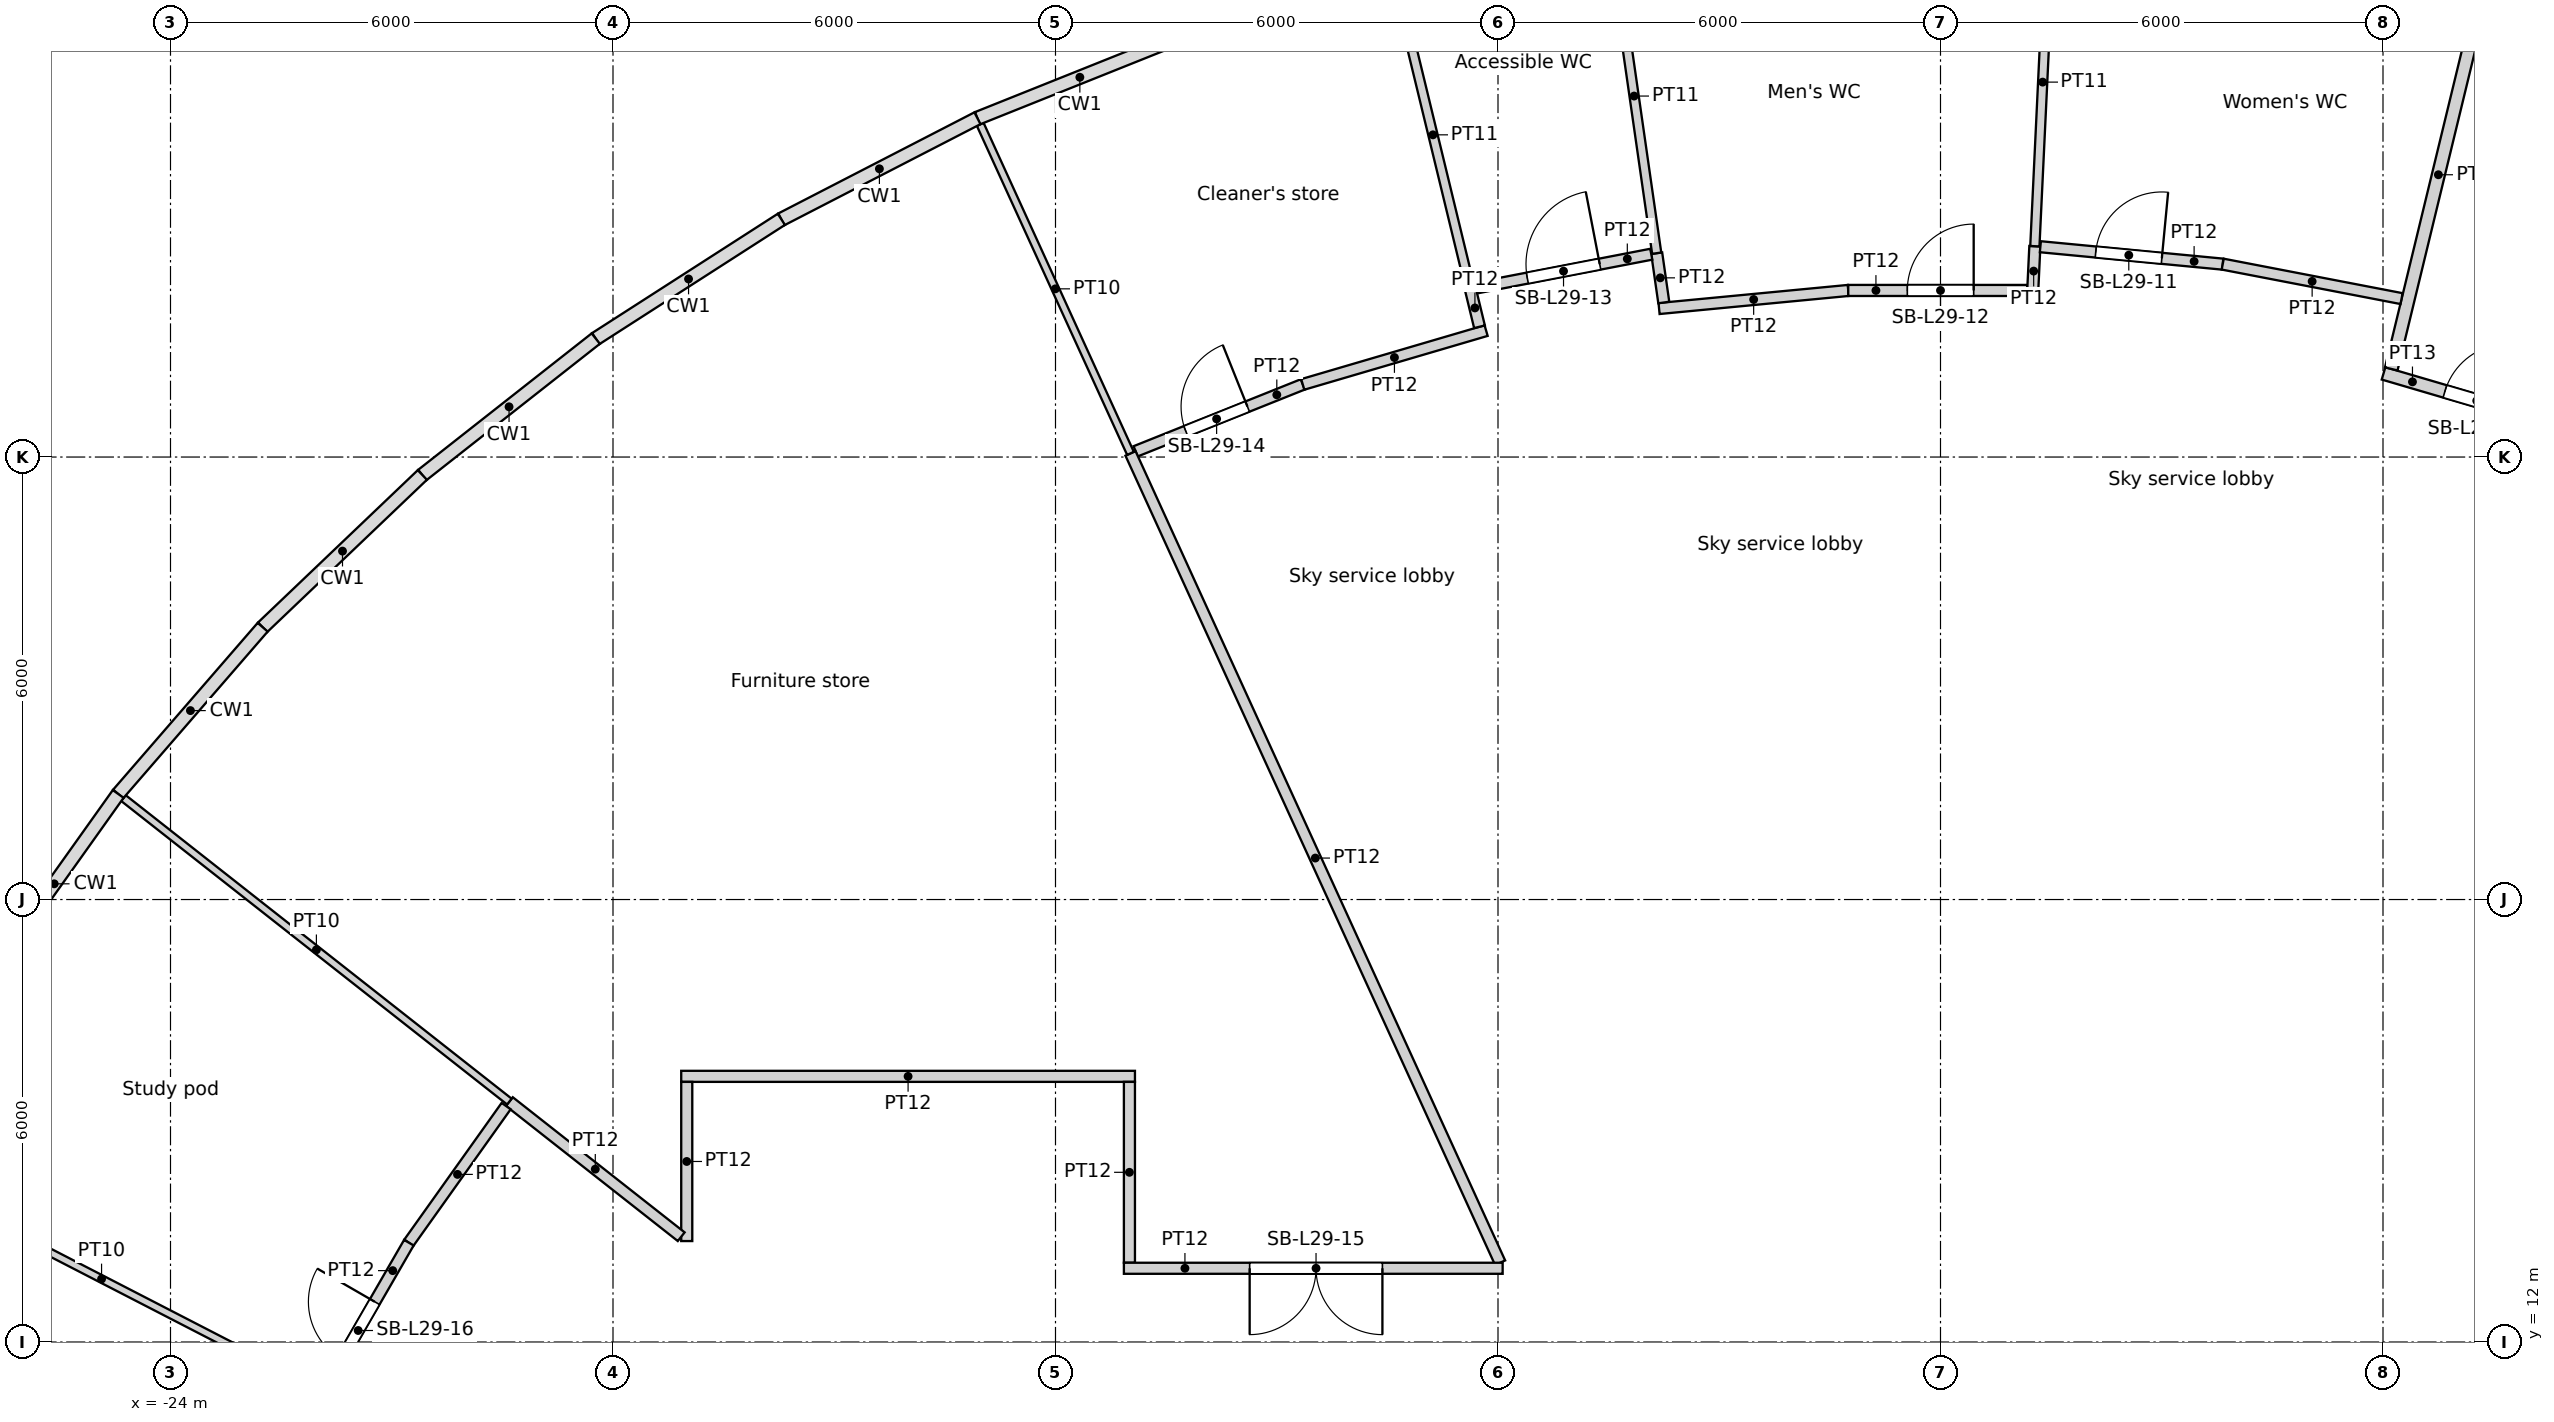
"""IFC4 building model, lengths in metres.
Left out: names, types, materials, properties, quantities, classifications, styles, units other than length and angle.
Written with IfcOpenShell. Run it as: python <this file> out.ifc"""

import sys

from ifc_helpers import new_model, si_unit, direction, frame, frame_2d, origin, origin_2d, place, context, subcontext, project, spatial, rectangle, circle, extrude, element, fill, save


model = new_model("IFC4")
c1 = context("Model", 3, precision=1e-05, world=origin(), true_north=direction((0.0, 1.0)))
c2 = subcontext(c1, "Body", "Model", "MODEL_VIEW")
j1 = project(units=[si_unit("LENGTHUNIT", "METRE"), si_unit("PLANEANGLEUNIT", "RADIAN")], contexts=[c1])
p1 = place(None, origin())
s1 = spatial("IfcSite", under=j1, at=p1, CompositionType="ELEMENT")
p2 = place(p1, origin())
s2 = spatial("IfcBuilding", under=s1, at=p2, CompositionType="ELEMENT")
p3 = place(p2, frame((0.0, 0.0, 114.6)))
s3 = spatial("IfcBuildingStorey", under=s2, at=p3, CompositionType="ELEMENT", Elevation=114.6)
for number, where, z_axis, x_axis in (
    (1, (7.137, 29.421, 0.0), (0.0, 0.0, 1.0), (1.0, 0.0, 0.0)),
    (2, (-4.309, 29.966, 0.0), (0.0, 0.0, 1.0), (1.0, 0.0, 0.0)),
    (3, (-9.902, 28.61, 0.0), (0.0, 0.0, 1.0), (1.0, 0.0, 0.0)),
    (4, (-15.137, 26.219, 0.0), (0.0, 0.0, 1.0), (1.0, 0.0, 0.0)),
    (5, (-19.826, 22.88, 0.0), (0.0, 0.0, 1.0), (1.0, 0.0, 0.0)),
    (6, (-23.797, 18.715, 0.0), (0.0, 0.0, 1.0), (1.0, 0.0, 0.0)),
):
    element("IfcColumn", number, at=place(p3, frame(where, z_axis=z_axis, x_axis=x_axis)), inside=s3, PredefinedType="COLUMN", context=c2, shape_type="SweptSolid", body=[
        extrude(circle(Radius=0.6, at=origin_2d()), origin(), (0.0, 0.0, 1.0), 5.4),
    ])
for number, where, z_axis, x_axis in (
    (7, (4.263, 24.175, 0.0), (0.0, 0.0, 1.0), (1.0, 0.0, 0.0)),
    (8, (-1.427, 24.506, 0.0), (0.0, 0.0, 1.0), (1.0, 0.0, 0.0)),
    (9, (-7.04, 23.516, 0.0), (0.0, 0.0, 1.0), (1.0, 0.0, 0.0)),
    (10, (-12.274, 21.259, 0.0), (0.0, 0.0, 1.0), (1.0, 0.0, 0.0)),
    (11, (-16.846, 17.855, 0.0), (0.0, 0.0, 1.0), (1.0, 0.0, 0.0)),
    (12, (-20.509, 13.489, 0.0), (0.0, 0.0, 1.0), (1.0, 0.0, 0.0)),
):
    element("IfcColumn", number, at=place(p3, frame(where, z_axis=z_axis, x_axis=x_axis)), inside=s3, PredefinedType="COLUMN", context=c2, shape_type="SweptSolid", body=[
        extrude(circle(Radius=0.65, at=origin_2d()), origin(), (0.0, 0.0, 1.0), 5.4),
    ])
for number, where, z_axis, x_axis in (
    (13, (6.876, 17.521, 0.0), (0.0, 0.0, 1.0), (1.0, 0.0, 0.0)),
    (14, (1.406, 18.77, 0.0), (0.0, 0.0, 1.0), (1.0, 0.0, 0.0)),
    (15, (-4.188, 18.35, 0.0), (0.0, 0.0, 1.0), (1.0, 0.0, 0.0)),
    (16, (-9.411, 16.301, 0.0), (0.0, 0.0, 1.0), (1.0, 0.0, 0.0)),
    (17, (-13.798, 12.802, 0.0), (0.0, 0.0, 1.0), (1.0, 0.0, 0.0)),
):
    element("IfcColumn", number, at=place(p3, frame(where, z_axis=z_axis, x_axis=x_axis)), inside=s3, PredefinedType="COLUMN", context=c2, shape_type="SweptSolid", body=[
        extrude(circle(Radius=0.7, at=origin_2d()), origin(), (0.0, 0.0, 1.0), 5.4),
    ])
p4 = place(p3, frame((-27.86, 14.363, 0.0), z_axis=(0.0, 0.0, 1.0), x_axis=(0.88884777779, -0.458202605751, 0.0)))
e18 = element("IfcWall", 18, at=p4, inside=s3, PredefinedType="PARTITIONING", context=c2, shape_type="SweptSolid", body=[
    extrude(rectangle(XDim=6.583, YDim=0.1, at=frame_2d((3.291, 0.0))), origin(), (0.0, 0.0, 1.0), 4.0),
])
p5 = place(p3, frame((-24.638, 19.376, 0.0), z_axis=(0.0, 0.0, 1.0), x_axis=(0.786065039075, -0.618143797464, 0.0)))
e19 = element("IfcWall", 19, at=p5, inside=s3, PredefinedType="PARTITIONING", context=c2, shape_type="SweptSolid", body=[
    extrude(rectangle(XDim=6.657, YDim=0.1, at=frame_2d((3.329, 0.0))), origin(), (0.0, 0.0, 1.0), 4.0),
])
p6 = place(p3, frame((-21.943, 11.312, 0.0), z_axis=(0.0, 0.0, 1.0), x_axis=(0.500073279432, 0.865983091751, 0.0)))
e20 = element("IfcWall", 20, at=p6, inside=s3, PredefinedType="PARTITIONING", context=c2, shape_type="SweptSolid", body=[
    extrude(rectangle(XDim=2.349, YDim=0.15, at=frame_2d((1.175, 0.0))), origin(), (0.0, 0.0, 1.0), 4.0),
])
p7 = place(p6, frame((0.525, 0.0, 0.0)))
e21 = element("IfcOpeningElement", 21, at=p7, cuts=e20, PredefinedType="OPENING", context=c2, shape_type="SweptSolid", body=[
    extrude(rectangle(XDim=0.9, YDim=2.1, at=frame_2d((0.45, 1.05))), frame((0.0, 0.075, 0.0), z_axis=(0.0, -1.0, 0.0), x_axis=(1.0, 0.0, 0.0)), (0.0, 0.0, 1.0), 0.15),
])
p8 = place(p3, frame((-19.449, 15.199, 0.0), z_axis=(0.0, 0.0, 1.0), x_axis=(-0.580029104411, -0.8145957513, 0.0)))
e22 = element("IfcWall", 22, at=p8, inside=s3, PredefinedType="PARTITIONING", context=c2, shape_type="SweptSolid", body=[
    extrude(rectangle(XDim=2.274, YDim=0.15, at=frame_2d((1.137, 0.0))), origin(), (0.0, 0.0, 1.0), 4.0),
])
p9 = place(p3, frame((-19.405, 15.26, 0.0), z_axis=(0.0, 0.0, 1.0), x_axis=(0.78606393764, -0.618145198106, 0.0)))
e23 = element("IfcWall", 23, at=p9, inside=s3, PredefinedType="PARTITIONING", context=c2, shape_type="SweptSolid", body=[
    extrude(rectangle(XDim=2.965, YDim=0.15, at=frame_2d((1.482, 0.0))), origin(), (0.0, 0.0, 1.0), 4.0),
])
p10 = place(p3, frame((-17.0, 15.527, 0.0), z_axis=(0.0, 0.0, 1.0), x_axis=(0.0, -1.0, 0.0)))
e24 = element("IfcWall", 24, at=p10, inside=s3, PredefinedType="PARTITIONING", context=c2, shape_type="SweptSolid", body=[
    extrude(rectangle(XDim=2.158, YDim=0.15, at=frame_2d((1.079, 0.0))), origin(), (0.0, 0.0, 1.0), 4.0),
])
p11 = place(p3, frame((-13.021, 28.512, 0.0), z_axis=(0.0, 0.0, 1.0), x_axis=(0.415403363215, -0.909637315544, 0.0)))
e25 = element("IfcWall", 25, at=p11, inside=s3, PredefinedType="PARTITIONING", context=c2, shape_type="SweptSolid", body=[
    extrude(rectangle(XDim=4.906, YDim=0.1, at=frame_2d((2.453, 0.0))), origin(), (0.0, 0.0, 1.0), 4.0),
])
p12 = place(p3, frame((-10.998, 13.075, 0.0), z_axis=(0.0, 0.0, 1.0), x_axis=(0.0, 1.0, 0.0)))
e26 = element("IfcWall", 26, at=p12, inside=s3, PredefinedType="PARTITIONING", context=c2, shape_type="SweptSolid", body=[
    extrude(rectangle(XDim=2.452, YDim=0.15, at=frame_2d((1.226, 0.0))), origin(), (0.0, 0.0, 1.0), 4.0),
])
p13 = place(p3, frame((-10.923, 15.602, 0.0), z_axis=(0.0, 0.0, 1.0), x_axis=(-1.0, 0.0, 0.0)))
e27 = element("IfcWall", 27, at=p13, inside=s3, PredefinedType="PARTITIONING", context=c2, shape_type="SweptSolid", body=[
    extrude(rectangle(XDim=6.152, YDim=0.15, at=frame_2d((3.076, 0.0))), origin(), (0.0, 0.0, 1.0), 4.0),
])
p14 = place(p3, frame((-10.983, 24.05, 0.0), z_axis=(0.0, 0.0, 1.0), x_axis=(0.415416845748, -0.909631158365, 0.0)))
e28 = element("IfcWall", 28, at=p14, inside=s3, PredefinedType="PARTITIONING", context=c2, shape_type="SweptSolid", body=[
    extrude(rectangle(XDim=12.065, YDim=0.15, at=frame_2d((6.032, 0.0))), origin(), (0.0, 0.0, 1.0), 4.0),
])
p15 = place(p3, frame((-10.913, 24.077, 0.0), z_axis=(0.0, 0.0, 1.0), x_axis=(0.928366285294, 0.371666571445, 0.0)))
e29 = element("IfcWall", 29, at=p15, inside=s3, PredefinedType="PARTITIONING", context=c2, shape_type="SweptSolid", body=[
    extrude(rectangle(XDim=2.441, YDim=0.15, at=frame_2d((1.22, 0.0))), origin(), (0.0, 0.0, 1.0), 4.0),
])
p16 = place(p15, frame((0.733, 0.0, 0.0)))
e30 = element("IfcOpeningElement", 30, at=p16, cuts=e29, PredefinedType="OPENING", context=c2, shape_type="SweptSolid", body=[
    extrude(rectangle(XDim=0.9, YDim=2.1, at=frame_2d((0.45, 1.05))), frame((0.0, 0.075, 0.0), z_axis=(0.0, -1.0, 0.0), x_axis=(1.0, 0.0, 0.0)), (0.0, 0.0, 1.0), 0.15),
])
p17 = place(p3, frame((-7.39, 30.461, 0.0), z_axis=(0.0, 0.0, 1.0), x_axis=(0.235763969247, -0.971810347138, 0.0)))
e31 = element("IfcWall", 31, at=p17, inside=s3, PredefinedType="PARTITIONING", context=c2, shape_type="SweptSolid", body=[
    extrude(rectangle(XDim=4.305, YDim=0.125, at=frame_2d((2.152, 0.0))), origin(), (0.0, 0.0, 1.0), 4.0),
])
p18 = place(p3, frame((-6.375, 26.277, 0.0), z_axis=(0.0, 0.0, 1.0), x_axis=(0.235533543779, -0.971866220091, 0.0)))
e32 = element("IfcWall", 32, at=p18, inside=s3, PredefinedType="PARTITIONING", context=c2, shape_type="SweptSolid", body=[
    extrude(rectangle(XDim=0.526, YDim=0.15, at=frame_2d((0.263, 0.0))), origin(), (0.0, 0.0, 1.0), 4.0),
])
p19 = place(p3, frame((-6.161, 25.715, 0.0), z_axis=(0.0, 0.0, 1.0), x_axis=(-0.959492937384, -0.28173268023, 0.0)))
e33 = element("IfcWall", 33, at=p19, inside=s3, PredefinedType="PARTITIONING", context=c2, shape_type="SweptSolid", body=[
    extrude(rectangle(XDim=2.591, YDim=0.15, at=frame_2d((1.295, 0.0))), origin(), (0.0, 0.0, 1.0), 4.0),
])
p20 = place(p3, frame((-11.073, 13.0, 0.0), z_axis=(0.0, 0.0, 1.0), x_axis=(1.0, 0.0, 0.0)))
e34 = element("IfcWall", 34, at=p20, inside=s3, PredefinedType="PARTITIONING", context=c2, shape_type="SweptSolid", body=[
    extrude(rectangle(XDim=5.135, YDim=0.15, at=frame_2d((2.568, 0.0))), origin(), (0.0, 0.0, 1.0), 4.0),
])
p21 = place(p20, frame((1.705, 0.0, 0.0)))
e35 = element("IfcOpeningElement", 35, at=p21, cuts=e34, PredefinedType="OPENING", context=c2, shape_type="SweptSolid", body=[
    extrude(rectangle(XDim=1.8, YDim=2.4, at=frame_2d((0.9, 1.2))), frame((0.0, 0.075, 0.0), z_axis=(0.0, -1.0, 0.0), x_axis=(1.0, 0.0, 0.0)), (0.0, 0.0, 1.0), 0.15),
])
p22 = place(p3, frame((-4.461, 31.025, 0.0), z_axis=(0.0, 0.0, 1.0), x_axis=(0.142294692294, -0.989824338226, 0.0)))
e36 = element("IfcWall", 36, at=p22, inside=s3, PredefinedType="PARTITIONING", context=c2, shape_type="SweptSolid", body=[
    extrude(rectangle(XDim=4.305, YDim=0.125, at=frame_2d((2.152, 0.0))), origin(), (0.0, 0.0, 1.0), 4.0),
])
p23 = place(p3, frame((-6.301, 26.292, 0.0), z_axis=(0.0, 0.0, 1.0), x_axis=(0.981932344741, 0.189232318463, 0.0)))
e37 = element("IfcWall", 37, at=p23, inside=s3, PredefinedType="PARTITIONING", context=c2, shape_type="SweptSolid", body=[
    extrude(rectangle(XDim=2.423, YDim=0.15, at=frame_2d((1.211, 0.0))), origin(), (0.0, 0.0, 1.0), 4.0),
])
p24 = place(p23, frame((0.711, 0.0, 0.0)))
e38 = element("IfcOpeningElement", 38, at=p24, cuts=e37, PredefinedType="OPENING", context=c2, shape_type="SweptSolid", body=[
    extrude(rectangle(XDim=1.0, YDim=2.1, at=frame_2d((0.5, 1.05))), frame((0.0, 0.075, 0.0), z_axis=(0.0, -1.0, 0.0), x_axis=(1.0, 0.0, 0.0)), (0.0, 0.0, 1.0), 0.15),
])
p25 = place(p3, frame((-3.848, 26.764, 0.0), z_axis=(0.0, 0.0, 1.0), x_axis=(0.142280765431, -0.989826340218, 0.0)))
e39 = element("IfcWall", 39, at=p25, inside=s3, PredefinedType="PARTITIONING", context=c2, shape_type="SweptSolid", body=[
    extrude(rectangle(XDim=0.676, YDim=0.15, at=frame_2d((0.338, 0.0))), origin(), (0.0, 0.0, 1.0), 4.0),
])
p26 = place(p3, frame((-1.251, 26.259, 0.0), z_axis=(0.0, 0.0, 1.0), x_axis=(-0.995473727837, -0.095037135829, 0.0)))
e40 = element("IfcWall", 40, at=p26, inside=s3, PredefinedType="PARTITIONING", context=c2, shape_type="SweptSolid", body=[
    extrude(rectangle(XDim=2.577, YDim=0.15, at=frame_2d((1.288, 0.0))), origin(), (0.0, 0.0, 1.0), 4.0),
])
p27 = place(p3, frame((-1.251, 26.259, 0.0), z_axis=(0.0, 0.0, 1.0), x_axis=(1.0, 0.0, 0.0)))
e41 = element("IfcWall", 41, at=p27, inside=s3, PredefinedType="PARTITIONING", context=c2, shape_type="SweptSolid", body=[
    extrude(rectangle(XDim=2.427, YDim=0.15, at=frame_2d((1.213, 0.0))), origin(), (0.0, 0.0, 1.0), 4.0),
])
p28 = place(p27, frame((0.801, 0.0, 0.0)))
e42 = element("IfcOpeningElement", 42, at=p28, cuts=e41, PredefinedType="OPENING", context=c2, shape_type="SweptSolid", body=[
    extrude(rectangle(XDim=0.9, YDim=2.1, at=frame_2d((0.45, 1.05))), frame((0.0, 0.075, 0.0), z_axis=(0.0, -1.0, 0.0), x_axis=(1.0, 0.0, 0.0)), (0.0, 0.0, 1.0), 0.15),
])
p29 = place(p3, frame((1.279, 26.859, 0.0), z_axis=(0.0, 0.0, 1.0), x_axis=(-0.047341937476, -0.998878741868, 0.0)))
e43 = element("IfcWall", 43, at=p29, inside=s3, PredefinedType="PARTITIONING", context=c2, shape_type="SweptSolid", body=[
    extrude(rectangle(XDim=0.676, YDim=0.15, at=frame_2d((0.338, 0.0))), origin(), (0.0, 0.0, 1.0), 4.0),
])
p30 = place(p3, frame((1.491, 31.309, 0.0), z_axis=(0.0, 0.0, 1.0), x_axis=(-0.047622430455, -0.99886540841, 0.0)))
e44 = element("IfcWall", 44, at=p30, inside=s3, PredefinedType="PARTITIONING", context=c2, shape_type="SweptSolid", body=[
    extrude(rectangle(XDim=4.455, YDim=0.125, at=frame_2d((2.228, 0.0))), origin(), (0.0, 0.0, 1.0), 4.0),
])
p31 = place(p3, frame((1.354, 26.852, 0.0), z_axis=(0.0, 0.0, 1.0), x_axis=(0.995473803063, -0.095036347869, 0.0)))
e45 = element("IfcWall", 45, at=p31, inside=s3, PredefinedType="PARTITIONING", context=c2, shape_type="SweptSolid", body=[
    extrude(rectangle(XDim=2.484, YDim=0.15, at=frame_2d((1.242, 0.0))), origin(), (0.0, 0.0, 1.0), 4.0),
])
p32 = place(p31, frame((0.754, 0.0, 0.0)))
e46 = element("IfcOpeningElement", 46, at=p32, cuts=e45, PredefinedType="OPENING", context=c2, shape_type="SweptSolid", body=[
    extrude(rectangle(XDim=0.9, YDim=2.1, at=frame_2d((0.45, 1.05))), frame((0.0, 0.075, 0.0), z_axis=(0.0, -1.0, 0.0), x_axis=(1.0, 0.0, 0.0)), (0.0, 0.0, 1.0), 0.15),
])
p33 = place(p3, frame((6.252, 26.148, 0.0), z_axis=(0.0, 0.0, 1.0), x_axis=(-0.981914660197, 0.189324061043, 0.0)))
e47 = element("IfcWall", 47, at=p33, inside=s3, PredefinedType="PARTITIONING", context=c2, shape_type="SweptSolid", body=[
    extrude(rectangle(XDim=2.469, YDim=0.15, at=frame_2d((1.235, 0.0))), origin(), (0.0, 0.0, 1.0), 4.0),
])
p34 = place(p3, frame((7.39, 30.461, 0.0), z_axis=(0.0, 0.0, 1.0), x_axis=(-0.235734136945, -0.971817584055, 0.0)))
e48 = element("IfcWall", 48, at=p34, inside=s3, PredefinedType="PARTITIONING", context=c2, shape_type="SweptSolid", body=[
    extrude(rectangle(XDim=5.418, YDim=0.175, at=frame_2d((2.709, 0.0))), origin(), (0.0, 0.0, 1.0), 4.0),
])
p35 = place(p3, frame((6.008, 25.135, 0.0), z_axis=(0.0, 0.0, 1.0), x_axis=(0.959475355364, -0.281792552155, 0.0)))
e49 = element("IfcWall", 49, at=p35, inside=s3, PredefinedType="PARTITIONING", context=c2, shape_type="SweptSolid", body=[
    extrude(rectangle(XDim=2.546, YDim=0.175, at=frame_2d((1.273, 0.0))), origin(), (0.0, 0.0, 1.0), 4.0),
])
p36 = place(p35, frame((0.867, 0.0, 0.0)))
e50 = element("IfcOpeningElement", 50, at=p36, cuts=e49, PredefinedType="OPENING", context=c2, shape_type="SweptSolid", body=[
    extrude(rectangle(XDim=0.9, YDim=2.1, at=frame_2d((0.45, 1.05))), frame((0.0, 0.087, 0.0), z_axis=(0.0, -1.0, 0.0), x_axis=(1.0, 0.0, 0.0)), (0.0, 0.0, 1.0), 0.175),
])
p37 = place(p36, origin())
e51 = element("IfcDoor", 51, at=p37, inside=s3, OperationType="SINGLE_SWING_RIGHT", PredefinedType="DOOR", context=c2, shape_type="SweptSolid", body=[
    extrude(rectangle(XDim=0.9, YDim=2.1, at=frame_2d((0.45, 1.05))), frame((0.0, 0.025, 0.0), z_axis=(0.0, -1.0, 0.0), x_axis=(1.0, 0.0, 0.0)), (0.0, 0.0, 1.0), 0.05),
])
fill(e50, e51)
p38 = place(p32, origin())
e52 = element("IfcDoor", 52, at=p38, inside=s3, OperationType="SINGLE_SWING_RIGHT", PredefinedType="DOOR", context=c2, shape_type="SweptSolid", body=[
    extrude(rectangle(XDim=0.9, YDim=2.1, at=frame_2d((0.45, 1.05))), frame((0.0, 0.025, 0.0), z_axis=(0.0, -1.0, 0.0), x_axis=(1.0, 0.0, 0.0)), (0.0, 0.0, 1.0), 0.05),
])
fill(e46, e52)
p39 = place(p28, origin())
e53 = element("IfcDoor", 53, at=p39, inside=s3, OperationType="SINGLE_SWING_RIGHT", PredefinedType="DOOR", context=c2, shape_type="SweptSolid", body=[
    extrude(rectangle(XDim=0.9, YDim=2.1, at=frame_2d((0.45, 1.05))), frame((0.0, 0.025, 0.0), z_axis=(0.0, -1.0, 0.0), x_axis=(1.0, 0.0, 0.0)), (0.0, 0.0, 1.0), 0.05),
])
fill(e42, e53)
p40 = place(p24, origin())
e54 = element("IfcDoor", 54, at=p40, inside=s3, OperationType="SINGLE_SWING_RIGHT", PredefinedType="DOOR", context=c2, shape_type="SweptSolid", body=[
    extrude(rectangle(XDim=1.0, YDim=2.1, at=frame_2d((0.5, 1.05))), frame((0.0, 0.025, 0.0), z_axis=(0.0, -1.0, 0.0), x_axis=(1.0, 0.0, 0.0)), (0.0, 0.0, 1.0), 0.05),
])
fill(e38, e54)
p41 = place(p16, origin())
e55 = element("IfcDoor", 55, at=p41, inside=s3, OperationType="SINGLE_SWING_RIGHT", PredefinedType="DOOR", context=c2, shape_type="SweptSolid", body=[
    extrude(rectangle(XDim=0.9, YDim=2.1, at=frame_2d((0.45, 1.05))), frame((0.0, 0.025, 0.0), z_axis=(0.0, -1.0, 0.0), x_axis=(1.0, 0.0, 0.0)), (0.0, 0.0, 1.0), 0.05),
])
fill(e30, e55)
p42 = place(p21, origin())
e56 = element("IfcDoor", 56, at=p42, inside=s3, OperationType="DOUBLE_DOOR_SINGLE_SWING", PredefinedType="DOOR", context=c2, shape_type="SweptSolid", body=[
    extrude(rectangle(XDim=1.8, YDim=2.4, at=frame_2d((0.9, 1.2))), frame((0.0, 0.025, 0.0), z_axis=(0.0, -1.0, 0.0), x_axis=(1.0, 0.0, 0.0)), (0.0, 0.0, 1.0), 0.05),
])
fill(e35, e56)
p43 = place(p7, origin())
e57 = element("IfcDoor", 57, at=p43, inside=s3, OperationType="SINGLE_SWING_RIGHT", PredefinedType="DOOR", context=c2, shape_type="SweptSolid", body=[
    extrude(rectangle(XDim=0.9, YDim=2.1, at=frame_2d((0.45, 1.05))), frame((0.0, 0.025, 0.0), z_axis=(0.0, -1.0, 0.0), x_axis=(1.0, 0.0, 0.0)), (0.0, 0.0, 1.0), 0.05),
])
fill(e21, e57)
save(model, sys.argv[1])
